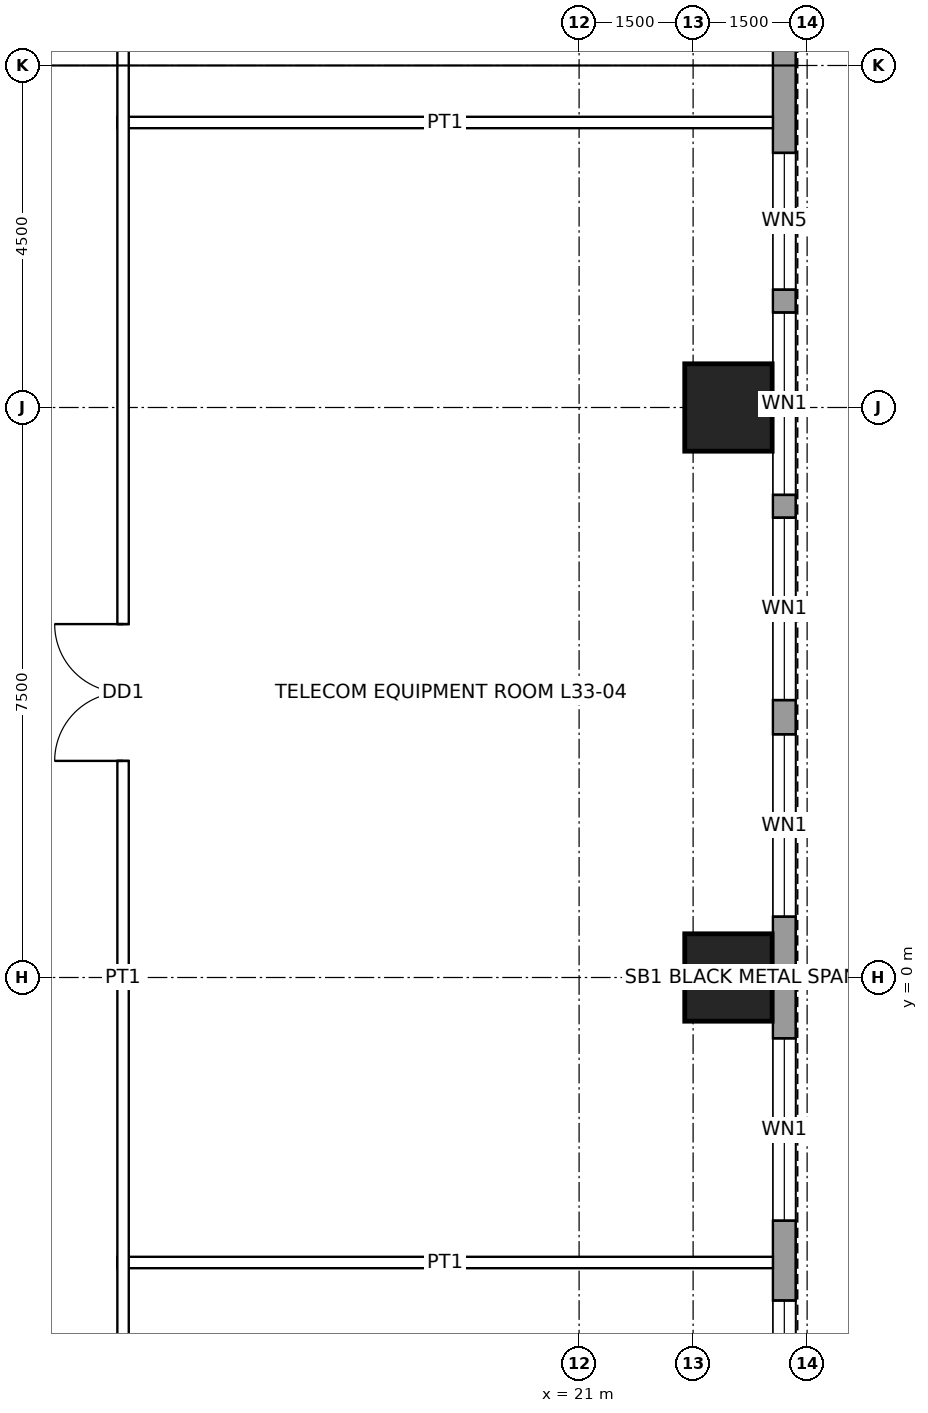
"""IFC4 building model, lengths in metres.
Left out: names, types, materials, properties, quantities, classifications, styles, units other than length and angle.
Written with IfcOpenShell. Run it as: python <this file> out.ifc"""

import sys

from ifc_helpers import new_model, si_unit, direction, frame, frame_2d, origin, origin_2d, place, context, subcontext, project, spatial, rectangle, hollow_rectangle, extrude, element, fill, save


model = new_model("IFC4")
c1 = context("Model", 3, precision=1e-05, world=origin(), true_north=direction((0.0, 1.0)))
c2 = subcontext(c1, "Body", "Model", "MODEL_VIEW")
j1 = project(units=[si_unit("LENGTHUNIT", "METRE"), si_unit("PLANEANGLEUNIT", "RADIAN")], contexts=[c1])
p1 = place(None, origin())
s1 = spatial("IfcSite", under=j1, at=p1, CompositionType="ELEMENT")
p2 = place(p1, origin())
s2 = spatial("IfcBuilding", under=s1, at=p2, CompositionType="ELEMENT")
p3 = place(p2, frame((0.0, 0.0, 162.9)))
s3 = spatial("IfcBuildingStorey", under=s2, at=p3, CompositionType="ELEMENT", Elevation=162.9)
for number, where, z_axis, x_axis in (
    (1, (22.965, 7.5, 0.0), (0.0, 0.0, 1.0), (1.0, 0.0, 0.0)),
    (2, (22.965, 0.0, 0.0), (0.0, 0.0, 1.0), (1.0, 0.0, 0.0)),
):
    element("IfcColumn", number, at=place(p3, frame(where, z_axis=z_axis, x_axis=x_axis)), inside=s3, PredefinedType="COLUMN", context=c2, shape_type="SweptSolid", body=[
        extrude(hollow_rectangle(XDim=1.15, YDim=1.15, WallThickness=0.075, at=origin_2d()), origin(), (0.0, 0.0, 1.0), 4.5),
    ])
p4 = place(p3, frame((23.7, 16.2, 0.0), z_axis=(0.0, 0.0, 1.0), x_axis=(0.0, -1.0, 0.0)))
e3 = element("IfcWall", 3, at=p4, inside=s3, PredefinedType="SOLIDWALL", context=c2, shape_type="SweptSolid", body=[
    extrude(rectangle(XDim=32.4, YDim=0.3, at=frame_2d((16.2, 0.0))), origin(), (0.0, 0.0, 1.0), 4.3),
])
p5 = place(p4, frame((5.35, 0.0, 1.0)))
e4 = element("IfcOpeningElement", 4, at=p5, cuts=e3, PredefinedType="OPENING", context=c2, shape_type="SweptSolid", body=[
    extrude(rectangle(XDim=1.8, YDim=1.2, at=frame_2d((0.9, 0.6))), frame((0.0, 0.16, 0.0), z_axis=(0.0, -1.0, 0.0), x_axis=(1.0, 0.0, 0.0)), (0.0, 0.0, 1.0), 0.32),
])
p6 = place(p4, frame((7.45, 0.0, 1.0)))
e5 = element("IfcOpeningElement", 5, at=p6, cuts=e3, PredefinedType="OPENING", context=c2, shape_type="SweptSolid", body=[
    extrude(rectangle(XDim=2.4, YDim=1.2, at=frame_2d((1.2, 0.6))), frame((0.0, 0.16, 0.0), z_axis=(0.0, -1.0, 0.0), x_axis=(1.0, 0.0, 0.0)), (0.0, 0.0, 1.0), 0.32),
])
p7 = place(p4, frame((10.15, 0.0, 1.0)))
e6 = element("IfcOpeningElement", 6, at=p7, cuts=e3, PredefinedType="OPENING", context=c2, shape_type="SweptSolid", body=[
    extrude(rectangle(XDim=2.4, YDim=1.2, at=frame_2d((1.2, 0.6))), frame((0.0, 0.16, 0.0), z_axis=(0.0, -1.0, 0.0), x_axis=(1.0, 0.0, 0.0)), (0.0, 0.0, 1.0), 0.32),
])
p8 = place(p4, frame((13.0, 0.0, 1.0)))
e7 = element("IfcOpeningElement", 7, at=p8, cuts=e3, PredefinedType="OPENING", context=c2, shape_type="SweptSolid", body=[
    extrude(rectangle(XDim=2.4, YDim=1.2, at=frame_2d((1.2, 0.6))), frame((0.0, 0.16, 0.0), z_axis=(0.0, -1.0, 0.0), x_axis=(1.0, 0.0, 0.0)), (0.0, 0.0, 1.0), 0.32),
])
p9 = place(p4, frame((17.0, 0.0, 1.0)))
e8 = element("IfcOpeningElement", 8, at=p9, cuts=e3, PredefinedType="OPENING", context=c2, shape_type="SweptSolid", body=[
    extrude(rectangle(XDim=2.4, YDim=1.2, at=frame_2d((1.2, 0.6))), frame((0.0, 0.16, 0.0), z_axis=(0.0, -1.0, 0.0), x_axis=(1.0, 0.0, 0.0)), (0.0, 0.0, 1.0), 0.32),
])
p10 = place(p4, frame((20.45, 0.0, 1.0)))
e9 = element("IfcOpeningElement", 9, at=p10, cuts=e3, PredefinedType="OPENING", context=c2, shape_type="SweptSolid", body=[
    extrude(rectangle(XDim=2.4, YDim=1.2, at=frame_2d((1.2, 0.6))), frame((0.0, 0.16, 0.0), z_axis=(0.0, -1.0, 0.0), x_axis=(1.0, 0.0, 0.0)), (0.0, 0.0, 1.0), 0.32),
])
p11 = place(p4, frame((23.15, 0.0, 1.0)))
e10 = element("IfcOpeningElement", 10, at=p11, cuts=e3, PredefinedType="OPENING", context=c2, shape_type="SweptSolid", body=[
    extrude(rectangle(XDim=1.8, YDim=1.2, at=frame_2d((0.9, 0.6))), frame((0.0, 0.16, 0.0), z_axis=(0.0, -1.0, 0.0), x_axis=(1.0, 0.0, 0.0)), (0.0, 0.0, 1.0), 0.32),
])
p12 = place(p4, frame((25.25, 0.0, 1.0)))
e11 = element("IfcOpeningElement", 11, at=p12, cuts=e3, PredefinedType="OPENING", context=c2, shape_type="SweptSolid", body=[
    extrude(rectangle(XDim=1.8, YDim=1.2, at=frame_2d((0.9, 0.6))), frame((0.0, 0.16, 0.0), z_axis=(0.0, -1.0, 0.0), x_axis=(1.0, 0.0, 0.0)), (0.0, 0.0, 1.0), 0.32),
])
for number, where, z_axis, x_axis in (
    (12, (14.925, -3.75, 0.0), (0.0, 0.0, 1.0), (1.0, 0.0, 0.0)),
    (13, (14.925, 11.25, 0.0), (0.0, 0.0, 1.0), (1.0, 0.0, 0.0)),
):
    element("IfcWall", number, at=place(p3, frame(where, z_axis=z_axis, x_axis=x_axis)), inside=s3, PredefinedType="PARTITIONING", context=c2, shape_type="SweptSolid", body=[
        extrude(rectangle(XDim=8.625, YDim=0.15, at=frame_2d((4.312, 0.0))), origin(), (0.0, 0.0, 1.0), 3.431),
    ])
p13 = place(p3, frame((15.0, -15.075, 0.0), z_axis=(0.0, 0.0, 1.0), x_axis=(0.0, 1.0, 0.0)))
e14 = element("IfcWall", 14, at=p13, inside=s3, PredefinedType="PARTITIONING", context=c2, shape_type="SweptSolid", body=[
    extrude(rectangle(XDim=30.15, YDim=0.15, at=frame_2d((15.075, 0.0))), origin(), (0.0, 0.0, 1.0), 4.3),
])
p14 = place(p13, frame((17.925, 0.0, 0.0)))
e15 = element("IfcOpeningElement", 15, at=p14, cuts=e14, PredefinedType="OPENING", context=c2, shape_type="SweptSolid", body=[
    extrude(rectangle(XDim=1.8, YDim=2.4, at=frame_2d((0.9, 1.2))), frame((0.0, 0.085, 0.0), z_axis=(0.0, -1.0, 0.0), x_axis=(1.0, 0.0, 0.0)), (0.0, 0.0, 1.0), 0.17),
])
p15 = place(p13, frame((6.675, 0.0, 0.0)))
e16 = element("IfcOpeningElement", 16, at=p15, cuts=e14, PredefinedType="OPENING", context=c2, shape_type="SweptSolid", body=[
    extrude(rectangle(XDim=1.8, YDim=2.4, at=frame_2d((0.9, 1.2))), frame((0.0, 0.085, 0.0), z_axis=(0.0, -1.0, 0.0), x_axis=(1.0, 0.0, 0.0)), (0.0, 0.0, 1.0), 0.17),
])
p16 = place(p5, origin())
e17 = element("IfcWindow", 17, at=p16, inside=s3, PartitioningType="SINGLE_PANEL", PredefinedType="WINDOW", context=c2, shape_type="SweptSolid", body=[
    extrude(rectangle(XDim=1.8, YDim=1.2, at=frame_2d((0.9, 0.6))), frame((0.0, 0.03, 0.0), z_axis=(0.0, -1.0, 0.0), x_axis=(1.0, 0.0, 0.0)), (0.0, 0.0, 1.0), 0.06),
])
fill(e4, e17)
p17 = place(p6, origin())
e18 = element("IfcWindow", 18, at=p17, inside=s3, PartitioningType="SINGLE_PANEL", PredefinedType="WINDOW", context=c2, shape_type="SweptSolid", body=[
    extrude(rectangle(XDim=2.4, YDim=1.2, at=frame_2d((1.2, 0.6))), frame((0.0, 0.03, 0.0), z_axis=(0.0, -1.0, 0.0), x_axis=(1.0, 0.0, 0.0)), (0.0, 0.0, 1.0), 0.06),
])
fill(e5, e18)
p18 = place(p7, origin())
e19 = element("IfcWindow", 19, at=p18, inside=s3, PartitioningType="SINGLE_PANEL", PredefinedType="WINDOW", context=c2, shape_type="SweptSolid", body=[
    extrude(rectangle(XDim=2.4, YDim=1.2, at=frame_2d((1.2, 0.6))), frame((0.0, 0.03, 0.0), z_axis=(0.0, -1.0, 0.0), x_axis=(1.0, 0.0, 0.0)), (0.0, 0.0, 1.0), 0.06),
])
fill(e6, e19)
p19 = place(p8, origin())
e20 = element("IfcWindow", 20, at=p19, inside=s3, PartitioningType="SINGLE_PANEL", PredefinedType="WINDOW", context=c2, shape_type="SweptSolid", body=[
    extrude(rectangle(XDim=2.4, YDim=1.2, at=frame_2d((1.2, 0.6))), frame((0.0, 0.03, 0.0), z_axis=(0.0, -1.0, 0.0), x_axis=(1.0, 0.0, 0.0)), (0.0, 0.0, 1.0), 0.06),
])
fill(e7, e20)
p20 = place(p9, origin())
e21 = element("IfcWindow", 21, at=p20, inside=s3, PartitioningType="SINGLE_PANEL", PredefinedType="WINDOW", context=c2, shape_type="SweptSolid", body=[
    extrude(rectangle(XDim=2.4, YDim=1.2, at=frame_2d((1.2, 0.6))), frame((0.0, 0.03, 0.0), z_axis=(0.0, -1.0, 0.0), x_axis=(1.0, 0.0, 0.0)), (0.0, 0.0, 1.0), 0.06),
])
fill(e8, e21)
p21 = place(p10, origin())
e22 = element("IfcWindow", 22, at=p21, inside=s3, PartitioningType="SINGLE_PANEL", PredefinedType="WINDOW", context=c2, shape_type="SweptSolid", body=[
    extrude(rectangle(XDim=2.4, YDim=1.2, at=frame_2d((1.2, 0.6))), frame((0.0, 0.03, 0.0), z_axis=(0.0, -1.0, 0.0), x_axis=(1.0, 0.0, 0.0)), (0.0, 0.0, 1.0), 0.06),
])
fill(e9, e22)
p22 = place(p14, origin())
e23 = element("IfcDoor", 23, at=p22, inside=s3, OperationType="DOUBLE_DOOR_SINGLE_SWING", PredefinedType="DOOR", context=c2, shape_type="SweptSolid", body=[
    extrude(rectangle(XDim=1.8, YDim=2.4, at=frame_2d((0.9, 1.2))), frame((0.0, 0.025, 0.0), z_axis=(0.0, -1.0, 0.0), x_axis=(1.0, 0.0, 0.0)), (0.0, 0.0, 1.0), 0.05),
])
fill(e15, e23)
save(model, sys.argv[1])
